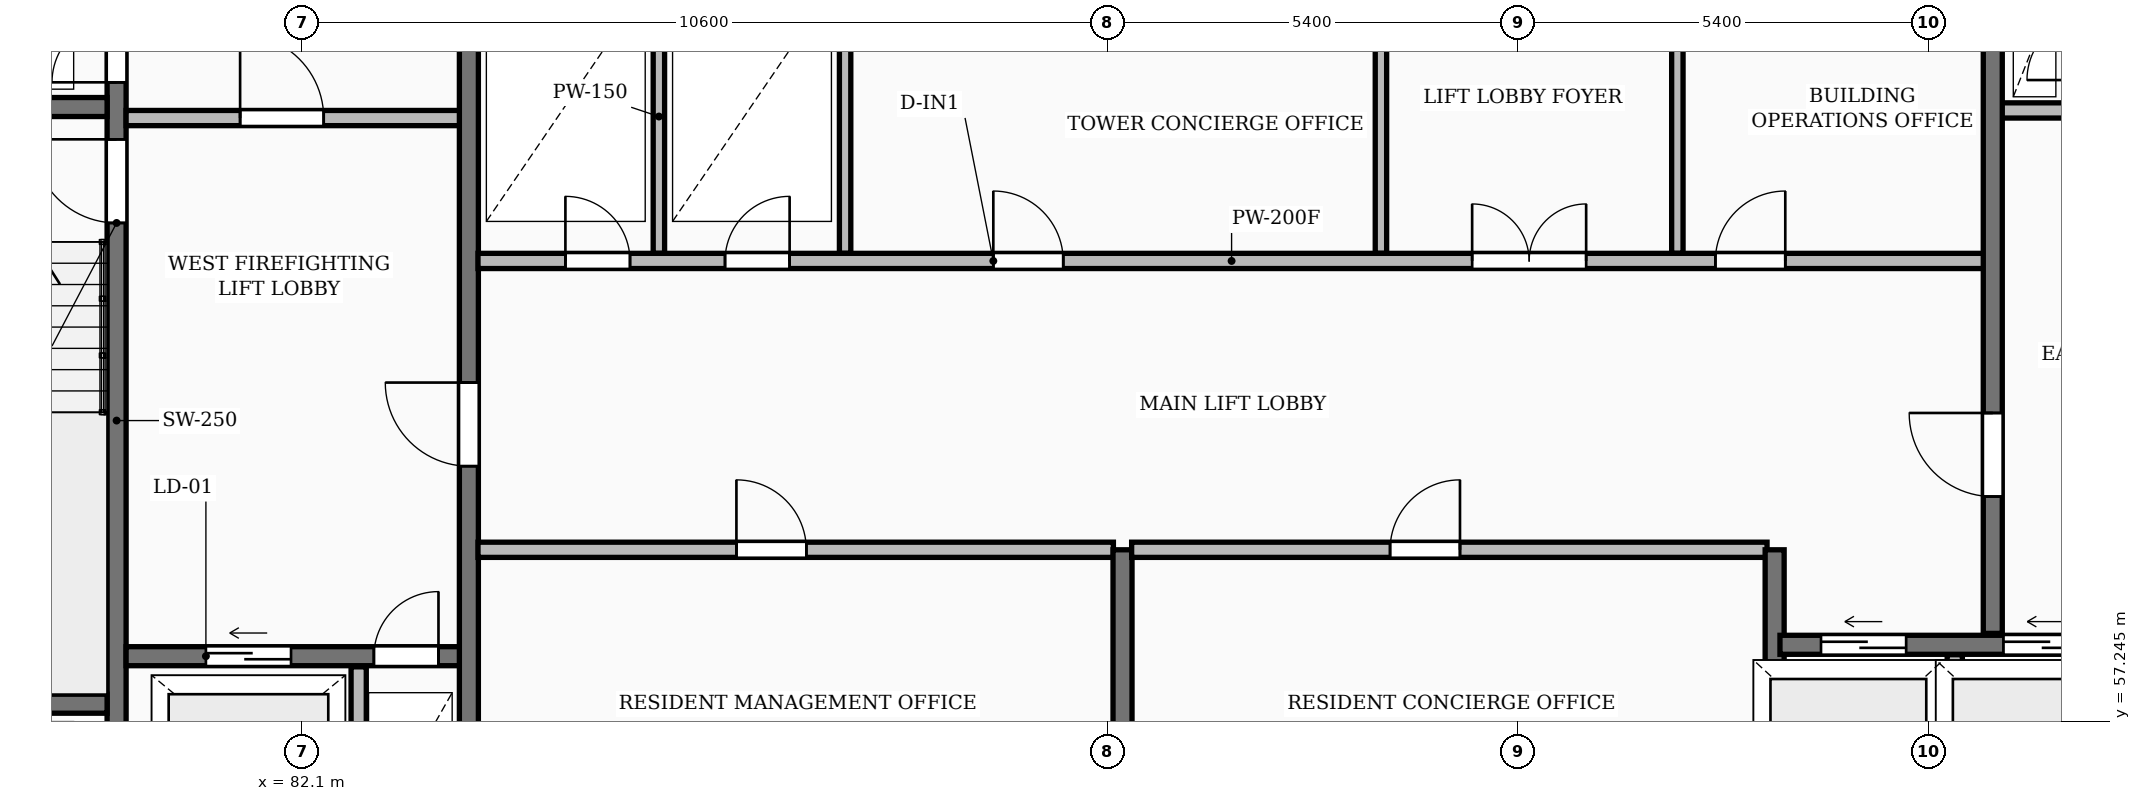
"""IFC4 building model, lengths in metres.
Left out: names, types, materials, properties, quantities, classifications, styles, units other than length and angle.
Written with IfcOpenShell. Run it as: python <this file> out.ifc"""

import sys

from ifc_helpers import new_model, si_unit, direction, frame, frame_2d, origin, place, context, subcontext, project, spatial, rectangle, extrude, element, fill, save


model = new_model("IFC4")
c1 = context("Model", 3, precision=1e-05, world=origin(), true_north=direction((0.0, 1.0)))
c2 = subcontext(c1, "Body", "Model", "MODEL_VIEW")
j1 = project(units=[si_unit("LENGTHUNIT", "METRE"), si_unit("PLANEANGLEUNIT", "RADIAN")], contexts=[c1])
p1 = place(None, origin())
s1 = spatial("IfcSite", under=j1, at=p1, CompositionType="ELEMENT")
p2 = place(p1, origin())
s2 = spatial("IfcBuilding", under=s1, at=p2, CompositionType="ELEMENT")
p3 = place(p2, frame((0.0, 0.0, 207.6)))
s3 = spatial("IfcBuildingStorey", under=s2, at=p3, CompositionType="ELEMENT", Elevation=207.6)
p4 = place(p3, frame((79.665, 55.4, 0.0), z_axis=(0.0, 0.0, 1.0), x_axis=(0.0, 1.0, 0.0)))
e1 = element("IfcWall", 1, at=p4, inside=s3, PredefinedType="SHEAR", context=c2, shape_type="SweptSolid", body=[
    extrude(rectangle(XDim=11.6, YDim=0.25, at=frame_2d((5.8, 0.0))), origin(), (0.0, 0.0, 1.0), 3.25),
])
p5 = place(p4, frame((0.55, 0.0, 0.0)))
e2 = element("IfcOpeningElement", 2, at=p5, cuts=e1, PredefinedType="OPENING", context=c2, shape_type="SweptSolid", body=[
    extrude(rectangle(XDim=0.85, YDim=2.05, at=frame_2d((0.425, 1.025))), frame((0.0, 0.135, 0.0), z_axis=(0.0, -1.0, 0.0), x_axis=(1.0, 0.0, 0.0)), (0.0, 0.0, 1.0), 0.27),
])
p6 = place(p4, frame((8.4, 0.0, 0.0)))
e3 = element("IfcOpeningElement", 3, at=p6, cuts=e1, PredefinedType="OPENING", context=c2, shape_type="SweptSolid", body=[
    extrude(rectangle(XDim=1.1, YDim=2.1, at=frame_2d((0.55, 1.05))), frame((0.0, 0.135, 0.0), z_axis=(0.0, -1.0, 0.0), x_axis=(1.0, 0.0, 0.0)), (0.0, 0.0, 1.0), 0.27),
])
p7 = place(p4, frame((10.25, 0.0, 0.0)))
e4 = element("IfcOpeningElement", 4, at=p7, cuts=e1, PredefinedType="OPENING", context=c2, shape_type="SweptSolid", body=[
    extrude(rectangle(XDim=0.85, YDim=2.05, at=frame_2d((0.425, 1.025))), frame((0.0, 0.135, 0.0), z_axis=(0.0, -1.0, 0.0), x_axis=(1.0, 0.0, 0.0)), (0.0, 0.0, 1.0), 0.27),
])
for number, where, z_axis, x_axis in (
    (5, (76.3, 57.475, 0.0), (0.0, 0.0, 1.0), (1.0, 0.0, 0.0)),
    (6, (76.3, 65.325, 0.0), (0.0, 0.0, 1.0), (1.0, 0.0, 0.0)),
):
    element("IfcWall", number, at=place(p3, frame(where, z_axis=z_axis, x_axis=x_axis)), inside=s3, PredefinedType="SHEAR", context=c2, shape_type="SweptSolid", body=[
        extrude(rectangle(XDim=3.24, YDim=0.25, at=frame_2d((1.62, 0.0))), origin(), (0.0, 0.0, 1.0), 3.25),
    ])
p8 = place(p3, frame((79.79, 58.1, 0.0), z_axis=(0.0, 0.0, 1.0), x_axis=(1.0, 0.0, 0.0)))
e7 = element("IfcWall", 7, at=p8, inside=s3, PredefinedType="SHEAR", context=c2, shape_type="SweptSolid", body=[
    extrude(rectangle(XDim=4.39, YDim=0.25, at=frame_2d((2.195, 0.0))), origin(), (0.0, 0.0, 1.0), 3.25),
])
p9 = place(p8, frame((1.05, 0.0, 0.0)))
e8 = element("IfcOpeningElement", 8, at=p9, cuts=e7, PredefinedType="OPENING", context=c2, shape_type="SweptSolid", body=[
    extrude(rectangle(XDim=1.12, YDim=2.12, at=frame_2d((0.56, 1.06))), frame((0.0, 0.135, 0.0), z_axis=(0.0, -1.0, 0.0), x_axis=(1.0, 0.0, 0.0)), (0.0, 0.0, 1.0), 0.27),
])
p10 = place(p8, frame((3.26, 0.0, 0.0)))
e9 = element("IfcOpeningElement", 9, at=p10, cuts=e7, PredefinedType="OPENING", context=c2, shape_type="SweptSolid", body=[
    extrude(rectangle(XDim=0.85, YDim=2.05, at=frame_2d((0.425, 1.025))), frame((0.0, 0.135, 0.0), z_axis=(0.0, -1.0, 0.0), x_axis=(1.0, 0.0, 0.0)), (0.0, 0.0, 1.0), 0.27),
])
p11 = place(p3, frame((82.85, 55.4, 0.0), z_axis=(0.0, 0.0, 1.0), x_axis=(0.0, 1.0, 0.0)))
e10 = element("IfcWall", 10, at=p11, inside=s3, PredefinedType="PARTITIONING", context=c2, shape_type="SweptSolid", body=[
    extrude(rectangle(XDim=2.56, YDim=0.2, at=frame_2d((1.28, 0.0))), origin(), (0.0, 0.0, 1.0), 2.97),
])
p12 = place(p3, frame((79.79, 65.18, 0.0), z_axis=(0.0, 0.0, 1.0), x_axis=(1.0, 0.0, 0.0)))
e11 = element("IfcWall", 11, at=p12, inside=s3, PredefinedType="PARTITIONING", context=c2, shape_type="SweptSolid", body=[
    extrude(rectangle(XDim=4.39, YDim=0.2, at=frame_2d((2.195, 0.0))), origin(), (0.0, 0.0, 1.0), 2.97),
])
p13 = place(p12, frame((1.5, 0.0, 0.0)))
e12 = element("IfcOpeningElement", 12, at=p13, cuts=e11, PredefinedType="OPENING", context=c2, shape_type="SweptSolid", body=[
    extrude(rectangle(XDim=1.1, YDim=2.1, at=frame_2d((0.55, 1.05))), frame((0.0, 0.11, 0.0), z_axis=(0.0, -1.0, 0.0), x_axis=(1.0, 0.0, 0.0)), (0.0, 0.0, 1.0), 0.22),
])
p14 = place(p3, frame((84.3, 55.4, 0.0), z_axis=(0.0, 0.0, 1.0), x_axis=(0.0, 1.0, 0.0)))
e13 = element("IfcWall", 13, at=p14, inside=s3, PredefinedType="SHEAR", context=c2, shape_type="SweptSolid", body=[
    extrude(rectangle(XDim=11.6, YDim=0.25, at=frame_2d((5.8, 0.0))), origin(), (0.0, 0.0, 1.0), 3.25),
])
p15 = place(p14, frame((5.2, 0.0, 0.0)))
e14 = element("IfcOpeningElement", 14, at=p15, cuts=e13, PredefinedType="OPENING", context=c2, shape_type="SweptSolid", body=[
    extrude(rectangle(XDim=1.1, YDim=2.1, at=frame_2d((0.55, 1.05))), frame((0.0, 0.135, 0.0), z_axis=(0.0, -1.0, 0.0), x_axis=(1.0, 0.0, 0.0)), (0.0, 0.0, 1.0), 0.27),
])
p16 = place(p3, frame((84.42, 59.5, 0.0), z_axis=(0.0, 0.0, 1.0), x_axis=(1.0, 0.0, 0.0)))
e15 = element("IfcWall", 15, at=p16, inside=s3, PredefinedType="PARTITIONING", context=c2, shape_type="SweptSolid", body=[
    extrude(rectangle(XDim=8.36, YDim=0.2, at=frame_2d((4.18, 0.0))), origin(), (0.0, 0.0, 1.0), 2.97),
])
p17 = place(p16, frame((3.4, 0.0, 0.0)))
e16 = element("IfcOpeningElement", 16, at=p17, cuts=e15, PredefinedType="OPENING", context=c2, shape_type="SweptSolid", body=[
    extrude(rectangle(XDim=0.92, YDim=2.08, at=frame_2d((0.46, 1.04))), frame((0.0, 0.11, 0.0), z_axis=(0.0, -1.0, 0.0), x_axis=(1.0, 0.0, 0.0)), (0.0, 0.0, 1.0), 0.22),
])
p18 = place(p3, frame((92.9, 55.4, 0.0), z_axis=(0.0, 0.0, 1.0), x_axis=(0.0, 1.0, 0.0)))
e17 = element("IfcWall", 17, at=p18, inside=s3, PredefinedType="SHEAR", context=c2, shape_type="SweptSolid", body=[
    extrude(rectangle(XDim=4.1, YDim=0.25, at=frame_2d((2.05, 0.0))), origin(), (0.0, 0.0, 1.0), 3.25),
])
p19 = place(p3, frame((93.02, 59.5, 0.0), z_axis=(0.0, 0.0, 1.0), x_axis=(1.0, 0.0, 0.0)))
e18 = element("IfcWall", 18, at=p19, inside=s3, PredefinedType="PARTITIONING", context=c2, shape_type="SweptSolid", body=[
    extrude(rectangle(XDim=8.36, YDim=0.2, at=frame_2d((4.18, 0.0))), origin(), (0.0, 0.0, 1.0), 2.97),
])
p20 = place(p19, frame((3.4, 0.0, 0.0)))
e19 = element("IfcOpeningElement", 19, at=p20, cuts=e18, PredefinedType="OPENING", context=c2, shape_type="SweptSolid", body=[
    extrude(rectangle(XDim=0.92, YDim=2.08, at=frame_2d((0.46, 1.04))), frame((0.0, 0.11, 0.0), z_axis=(0.0, -1.0, 0.0), x_axis=(1.0, 0.0, 0.0)), (0.0, 0.0, 1.0), 0.22),
])
p21 = place(p3, frame((101.48, 55.4, 0.0), z_axis=(0.0, 0.0, 1.0), x_axis=(0.0, 1.0, 0.0)))
e20 = element("IfcWall", 20, at=p21, inside=s3, PredefinedType="SHEAR", context=c2, shape_type="SweptSolid", body=[
    extrude(rectangle(XDim=4.1, YDim=0.25, at=frame_2d((2.05, 0.0))), origin(), (0.0, 0.0, 1.0), 3.25),
])
p22 = place(p3, frame((103.85, 55.4, 0.0), z_axis=(0.0, 0.0, 1.0), x_axis=(0.0, 1.0, 0.0)))
e21 = element("IfcWall", 21, at=p22, inside=s3, PredefinedType="PARTITIONING", context=c2, shape_type="SweptSolid", body=[
    extrude(rectangle(XDim=2.72, YDim=0.2, at=frame_2d((1.36, 0.0))), origin(), (0.0, 0.0, 1.0), 2.97),
])
p23 = place(p3, frame((101.55, 58.25, 0.0), z_axis=(0.0, 0.0, 1.0), x_axis=(1.0, 0.0, 0.0)))
e22 = element("IfcWall", 22, at=p23, inside=s3, PredefinedType="SHEAR", context=c2, shape_type="SweptSolid", body=[
    extrude(rectangle(XDim=4.6, YDim=0.25, at=frame_2d((2.3, 0.0))), origin(), (0.0, 0.0, 1.0), 3.25),
])
p24 = place(p23, frame((0.54, 0.0, 0.0)))
e23 = element("IfcOpeningElement", 23, at=p24, cuts=e22, PredefinedType="OPENING", context=c2, shape_type="SweptSolid", body=[
    extrude(rectangle(XDim=1.12, YDim=2.12, at=frame_2d((0.56, 1.06))), frame((0.0, 0.135, 0.0), z_axis=(0.0, -1.0, 0.0), x_axis=(1.0, 0.0, 0.0)), (0.0, 0.0, 1.0), 0.27),
])
p25 = place(p23, frame((2.94, 0.0, 0.0)))
e24 = element("IfcOpeningElement", 24, at=p25, cuts=e22, PredefinedType="OPENING", context=c2, shape_type="SweptSolid", body=[
    extrude(rectangle(XDim=1.12, YDim=2.12, at=frame_2d((0.56, 1.06))), frame((0.0, 0.135, 0.0), z_axis=(0.0, -1.0, 0.0), x_axis=(1.0, 0.0, 0.0)), (0.0, 0.0, 1.0), 0.27),
])
for number, where, z_axis, x_axis in (
    (25, (86.8, 63.4, 0.0), (0.0, 0.0, 1.0), (0.0, 1.0, 0.0)),
    (26, (89.25, 63.4, 0.0), (0.0, 0.0, 1.0), (0.0, 1.0, 0.0)),
    (27, (96.3, 63.4, 0.0), (0.0, 0.0, 1.0), (0.0, 1.0, 0.0)),
    (28, (100.2, 63.4, 0.0), (0.0, 0.0, 1.0), (0.0, 1.0, 0.0)),
):
    element("IfcWall", number, at=place(p3, frame(where, z_axis=z_axis, x_axis=x_axis)), inside=s3, PredefinedType="PARTITIONING", context=c2, shape_type="SweptSolid", body=[
        extrude(rectangle(XDim=3.6, YDim=0.15, at=frame_2d((1.8, 0.0))), origin(), (0.0, 0.0, 1.0), 2.97),
    ])
p26 = place(p3, frame((84.42, 63.3, 0.0), z_axis=(0.0, 0.0, 1.0), x_axis=(1.0, 0.0, 0.0)))
e29 = element("IfcWall", 29, at=p26, inside=s3, PredefinedType="PARTITIONING", context=c2, shape_type="SweptSolid", body=[
    extrude(rectangle(XDim=19.83, YDim=0.2, at=frame_2d((9.915, 0.0))), origin(), (0.0, 0.0, 1.0), 2.97),
])
p27 = place(p26, frame((1.15, 0.0, 0.0)))
e30 = element("IfcOpeningElement", 30, at=p27, cuts=e29, PredefinedType="OPENING", context=c2, shape_type="SweptSolid", body=[
    extrude(rectangle(XDim=0.85, YDim=2.05, at=frame_2d((0.425, 1.025))), frame((0.0, 0.11, 0.0), z_axis=(0.0, -1.0, 0.0), x_axis=(1.0, 0.0, 0.0)), (0.0, 0.0, 1.0), 0.22),
])
p28 = place(p26, frame((3.25, 0.0, 0.0)))
e31 = element("IfcOpeningElement", 31, at=p28, cuts=e29, PredefinedType="OPENING", context=c2, shape_type="SweptSolid", body=[
    extrude(rectangle(XDim=0.85, YDim=2.05, at=frame_2d((0.425, 1.025))), frame((0.0, 0.11, 0.0), z_axis=(0.0, -1.0, 0.0), x_axis=(1.0, 0.0, 0.0)), (0.0, 0.0, 1.0), 0.22),
])
p29 = place(p26, frame((13.08, 0.0, 0.0)))
e32 = element("IfcOpeningElement", 32, at=p29, cuts=e29, PredefinedType="OPENING", context=c2, shape_type="SweptSolid", body=[
    extrude(rectangle(XDim=1.5, YDim=2.2, at=frame_2d((0.75, 1.1))), frame((0.0, 0.11, 0.0), z_axis=(0.0, -1.0, 0.0), x_axis=(1.0, 0.0, 0.0)), (0.0, 0.0, 1.0), 0.22),
])
p30 = place(p26, frame((6.78, 0.0, 0.0)))
e33 = element("IfcOpeningElement", 33, at=p30, cuts=e29, PredefinedType="OPENING", context=c2, shape_type="SweptSolid", body=[
    extrude(rectangle(XDim=0.92, YDim=2.08, at=frame_2d((0.46, 1.04))), frame((0.0, 0.11, 0.0), z_axis=(0.0, -1.0, 0.0), x_axis=(1.0, 0.0, 0.0)), (0.0, 0.0, 1.0), 0.22),
])
p31 = place(p26, frame((16.28, 0.0, 0.0)))
e34 = element("IfcOpeningElement", 34, at=p31, cuts=e29, PredefinedType="OPENING", context=c2, shape_type="SweptSolid", body=[
    extrude(rectangle(XDim=0.92, YDim=2.08, at=frame_2d((0.46, 1.04))), frame((0.0, 0.11, 0.0), z_axis=(0.0, -1.0, 0.0), x_axis=(1.0, 0.0, 0.0)), (0.0, 0.0, 1.0), 0.22),
])
p32 = place(p3, frame((104.45, 65.28, 0.0), z_axis=(0.0, 0.0, 1.0), x_axis=(1.0, 0.0, 0.0)))
e35 = element("IfcWall", 35, at=p32, inside=s3, PredefinedType="PARTITIONING", context=c2, shape_type="SweptSolid", body=[
    extrude(rectangle(XDim=1.2, YDim=0.2, at=frame_2d((0.6, 0.0))), origin(), (0.0, 0.0, 1.0), 2.97),
])
p33 = place(p3, frame((104.35, 58.4, 0.0), z_axis=(0.0, 0.0, 1.0), x_axis=(0.0, 1.0, 0.0)))
e36 = element("IfcWall", 36, at=p33, inside=s3, PredefinedType="SHEAR", context=c2, shape_type="SweptSolid", body=[
    extrude(rectangle(XDim=8.6, YDim=0.25, at=frame_2d((4.3, 0.0))), origin(), (0.0, 0.0, 1.0), 3.25),
])
p34 = place(p33, frame((1.8, 0.0, 0.0)))
e37 = element("IfcOpeningElement", 37, at=p34, cuts=e36, PredefinedType="OPENING", context=c2, shape_type="SweptSolid", body=[
    extrude(rectangle(XDim=1.1, YDim=2.1, at=frame_2d((0.55, 1.05))), frame((0.0, 0.135, 0.0), z_axis=(0.0, -1.0, 0.0), x_axis=(1.0, 0.0, 0.0)), (0.0, 0.0, 1.0), 0.27),
])
p35 = place(p6, origin())
e38 = element("IfcDoor", 38, at=p35, inside=s3, OperationType="SINGLE_SWING_RIGHT", PredefinedType="DOOR", context=c2, shape_type="SweptSolid", body=[
    extrude(rectangle(XDim=1.1, YDim=2.1, at=frame_2d((0.55, 1.05))), frame((0.0, 0.025, 0.0), z_axis=(0.0, -1.0, 0.0), x_axis=(1.0, 0.0, 0.0)), (0.0, 0.0, 1.0), 0.05),
])
fill(e3, e38)
p36 = place(p7, origin())
e39 = element("IfcDoor", 39, at=p36, inside=s3, OperationType="SINGLE_SWING_LEFT", PredefinedType="DOOR", context=c2, shape_type="SweptSolid", body=[
    extrude(rectangle(XDim=0.85, YDim=2.05, at=frame_2d((0.425, 1.025))), frame((0.0, 0.025, 0.0), z_axis=(0.0, -1.0, 0.0), x_axis=(1.0, 0.0, 0.0)), (0.0, 0.0, 1.0), 0.05),
])
fill(e4, e39)
p37 = place(p9, origin())
e40 = element("IfcDoor", 40, at=p37, inside=s3, OperationType="SLIDING_TO_LEFT", PredefinedType="DOOR", context=c2, shape_type="SweptSolid", body=[
    extrude(rectangle(XDim=1.12, YDim=2.12, at=frame_2d((0.56, 1.06))), frame((0.0, 0.025, 0.0), z_axis=(0.0, -1.0, 0.0), x_axis=(1.0, 0.0, 0.0)), (0.0, 0.0, 1.0), 0.05),
])
fill(e8, e40)
p38 = place(p10, origin())
e41 = element("IfcDoor", 41, at=p38, inside=s3, OperationType="SINGLE_SWING_RIGHT", PredefinedType="DOOR", context=c2, shape_type="SweptSolid", body=[
    extrude(rectangle(XDim=0.85, YDim=2.05, at=frame_2d((0.425, 1.025))), frame((0.0, 0.025, 0.0), z_axis=(0.0, -1.0, 0.0), x_axis=(1.0, 0.0, 0.0)), (0.0, 0.0, 1.0), 0.05),
])
fill(e9, e41)
p39 = place(p13, origin())
e42 = element("IfcDoor", 42, at=p39, inside=s3, OperationType="SINGLE_SWING_LEFT", PredefinedType="DOOR", context=c2, shape_type="SweptSolid", body=[
    extrude(rectangle(XDim=1.1, YDim=2.1, at=frame_2d((0.55, 1.05))), frame((0.0, 0.025, 0.0), z_axis=(0.0, -1.0, 0.0), x_axis=(1.0, 0.0, 0.0)), (0.0, 0.0, 1.0), 0.05),
])
fill(e12, e42)
p40 = place(p15, origin())
e43 = element("IfcDoor", 43, at=p40, inside=s3, OperationType="SINGLE_SWING_RIGHT", PredefinedType="DOOR", context=c2, shape_type="SweptSolid", body=[
    extrude(rectangle(XDim=1.1, YDim=2.1, at=frame_2d((0.55, 1.05))), frame((0.0, 0.025, 0.0), z_axis=(0.0, -1.0, 0.0), x_axis=(1.0, 0.0, 0.0)), (0.0, 0.0, 1.0), 0.05),
])
fill(e14, e43)
p41 = place(p17, origin())
e44 = element("IfcDoor", 44, at=p41, inside=s3, OperationType="SINGLE_SWING_LEFT", PredefinedType="DOOR", context=c2, shape_type="SweptSolid", body=[
    extrude(rectangle(XDim=0.92, YDim=2.08, at=frame_2d((0.46, 1.04))), frame((0.0, 0.025, 0.0), z_axis=(0.0, -1.0, 0.0), x_axis=(1.0, 0.0, 0.0)), (0.0, 0.0, 1.0), 0.05),
])
fill(e16, e44)
p42 = place(p20, origin())
e45 = element("IfcDoor", 45, at=p42, inside=s3, OperationType="SINGLE_SWING_RIGHT", PredefinedType="DOOR", context=c2, shape_type="SweptSolid", body=[
    extrude(rectangle(XDim=0.92, YDim=2.08, at=frame_2d((0.46, 1.04))), frame((0.0, 0.025, 0.0), z_axis=(0.0, -1.0, 0.0), x_axis=(1.0, 0.0, 0.0)), (0.0, 0.0, 1.0), 0.05),
])
fill(e19, e45)
p43 = place(p24, origin())
e46 = element("IfcDoor", 46, at=p43, inside=s3, OperationType="SLIDING_TO_LEFT", PredefinedType="DOOR", context=c2, shape_type="SweptSolid", body=[
    extrude(rectangle(XDim=1.12, YDim=2.12, at=frame_2d((0.56, 1.06))), frame((0.0, 0.025, 0.0), z_axis=(0.0, -1.0, 0.0), x_axis=(1.0, 0.0, 0.0)), (0.0, 0.0, 1.0), 0.05),
])
fill(e23, e46)
p44 = place(p25, origin())
e47 = element("IfcDoor", 47, at=p44, inside=s3, OperationType="SLIDING_TO_LEFT", PredefinedType="DOOR", context=c2, shape_type="SweptSolid", body=[
    extrude(rectangle(XDim=1.12, YDim=2.12, at=frame_2d((0.56, 1.06))), frame((0.0, 0.025, 0.0), z_axis=(0.0, -1.0, 0.0), x_axis=(1.0, 0.0, 0.0)), (0.0, 0.0, 1.0), 0.05),
])
fill(e24, e47)
p45 = place(p27, origin())
e48 = element("IfcDoor", 48, at=p45, inside=s3, OperationType="SINGLE_SWING_LEFT", PredefinedType="DOOR", context=c2, shape_type="SweptSolid", body=[
    extrude(rectangle(XDim=0.85, YDim=2.05, at=frame_2d((0.425, 1.025))), frame((0.0, 0.025, 0.0), z_axis=(0.0, -1.0, 0.0), x_axis=(1.0, 0.0, 0.0)), (0.0, 0.0, 1.0), 0.05),
])
fill(e30, e48)
p46 = place(p28, origin())
e49 = element("IfcDoor", 49, at=p46, inside=s3, OperationType="SINGLE_SWING_RIGHT", PredefinedType="DOOR", context=c2, shape_type="SweptSolid", body=[
    extrude(rectangle(XDim=0.85, YDim=2.05, at=frame_2d((0.425, 1.025))), frame((0.0, 0.025, 0.0), z_axis=(0.0, -1.0, 0.0), x_axis=(1.0, 0.0, 0.0)), (0.0, 0.0, 1.0), 0.05),
])
fill(e31, e49)
p47 = place(p29, origin())
e50 = element("IfcDoor", 50, at=p47, inside=s3, OperationType="DOUBLE_DOOR_SINGLE_SWING", PredefinedType="DOOR", context=c2, shape_type="SweptSolid", body=[
    extrude(rectangle(XDim=1.5, YDim=2.2, at=frame_2d((0.75, 1.1))), frame((0.0, 0.025, 0.0), z_axis=(0.0, -1.0, 0.0), x_axis=(1.0, 0.0, 0.0)), (0.0, 0.0, 1.0), 0.05),
])
fill(e32, e50)
p48 = place(p30, origin())
e51 = element("IfcDoor", 51, at=p48, inside=s3, OperationType="SINGLE_SWING_LEFT", PredefinedType="DOOR", context=c2, shape_type="SweptSolid", body=[
    extrude(rectangle(XDim=0.92, YDim=2.08, at=frame_2d((0.46, 1.04))), frame((0.0, 0.025, 0.0), z_axis=(0.0, -1.0, 0.0), x_axis=(1.0, 0.0, 0.0)), (0.0, 0.0, 1.0), 0.05),
])
fill(e33, e51)
p49 = place(p31, origin())
e52 = element("IfcDoor", 52, at=p49, inside=s3, OperationType="SINGLE_SWING_RIGHT", PredefinedType="DOOR", context=c2, shape_type="SweptSolid", body=[
    extrude(rectangle(XDim=0.92, YDim=2.08, at=frame_2d((0.46, 1.04))), frame((0.0, 0.025, 0.0), z_axis=(0.0, -1.0, 0.0), x_axis=(1.0, 0.0, 0.0)), (0.0, 0.0, 1.0), 0.05),
])
fill(e34, e52)
p50 = place(p34, origin())
e53 = element("IfcDoor", 53, at=p50, inside=s3, OperationType="SINGLE_SWING_RIGHT", PredefinedType="DOOR", context=c2, shape_type="SweptSolid", body=[
    extrude(rectangle(XDim=1.1, YDim=2.1, at=frame_2d((0.55, 1.05))), frame((0.0, 0.025, 0.0), z_axis=(0.0, -1.0, 0.0), x_axis=(1.0, 0.0, 0.0)), (0.0, 0.0, 1.0), 0.05),
])
fill(e37, e53)
save(model, sys.argv[1])
